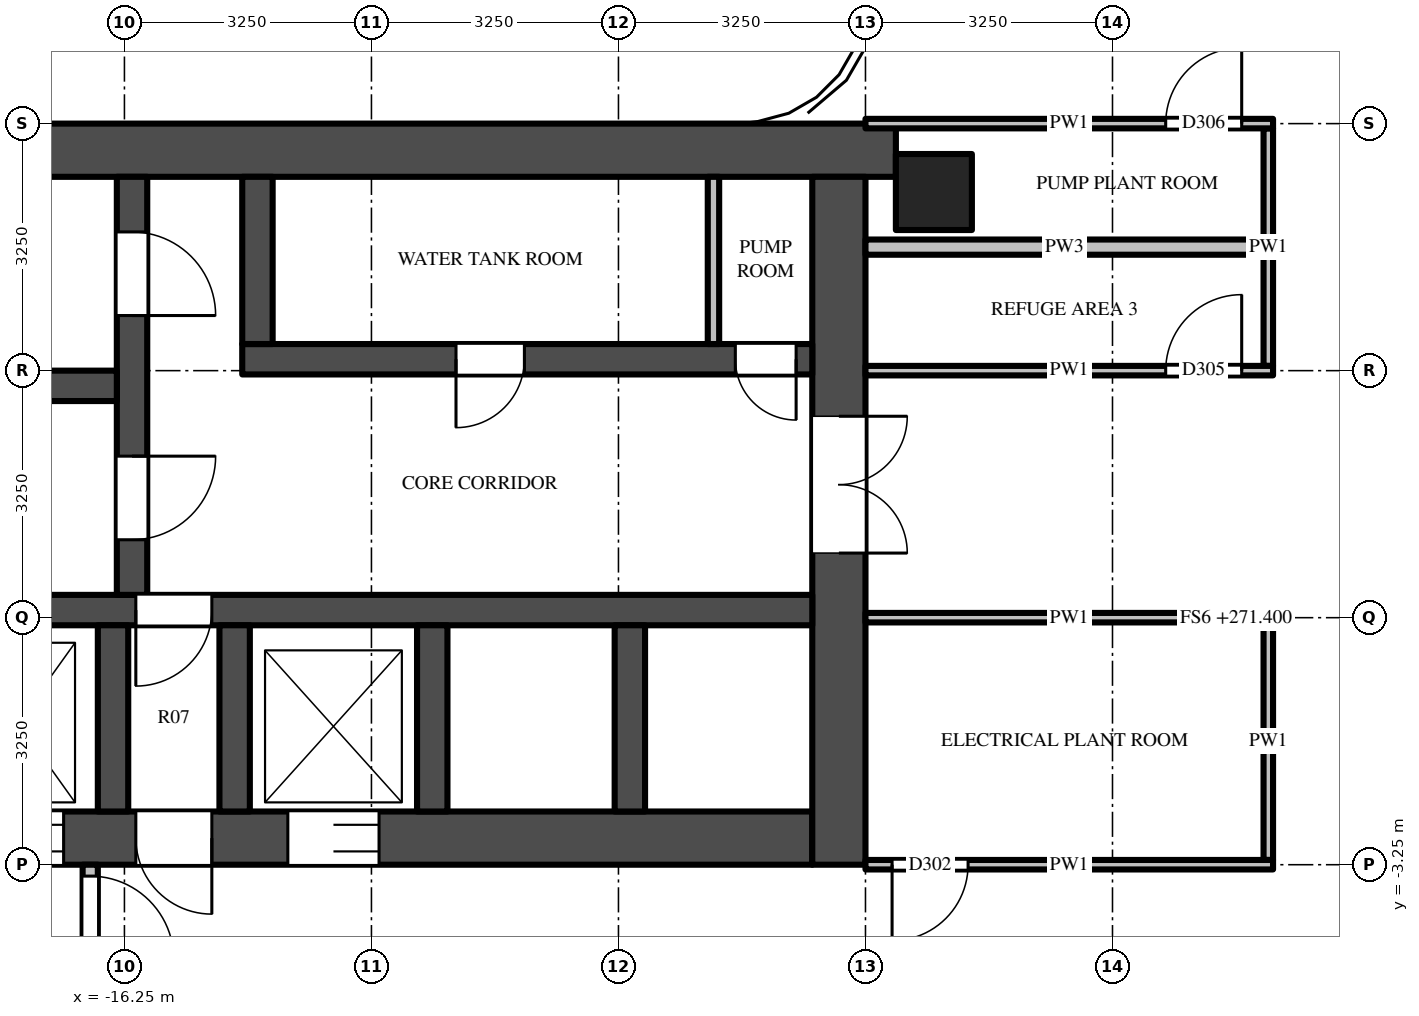
"""IFC4 building model, lengths in metres.
Left out: names, types, materials, properties, quantities, classifications, styles, units other than length and angle.
Written with IfcOpenShell. Run it as: python <this file> out.ifc"""

import sys

from ifc_helpers import new_model, si_unit, direction, frame, frame_2d, origin, origin_2d, place, context, subcontext, project, spatial, rectangle, extrude, source, transform, mapped, element, fill, save


model = new_model("IFC4")
c1 = context("Model", 3, precision=1e-05, world=origin(), true_north=direction((0.0, 1.0)))
c2 = subcontext(c1, "Body", "Model", "MODEL_VIEW")
j1 = project(units=[si_unit("LENGTHUNIT", "METRE"), si_unit("PLANEANGLEUNIT", "RADIAN")], contexts=[c1])
p1 = place(None, origin())
s1 = spatial("IfcSite", under=j1, at=p1, CompositionType="ELEMENT")
p2 = place(p1, origin())
s2 = spatial("IfcBuilding", under=s1, at=p2, CompositionType="ELEMENT")
p3 = place(p2, frame((0.0, 0.0, 271.4)))
s3 = spatial("IfcBuildingStorey", under=s2, at=p3, CompositionType="ELEMENT", Elevation=271.4)
m1 = source(origin(), c2, "Body", "SweptSolid", [
    extrude(rectangle(XDim=1.0, YDim=1.0, at=origin_2d()), origin(), (0.0, 0.0, 1.0), 8.0),
])
p4 = place(p3, frame((-5.6, 5.6, 0.0), z_axis=(0.0, 0.0, 1.0), x_axis=(1.0, 0.0, 0.0)))
e1 = element("IfcColumn", 1, at=p4, inside=s3, PredefinedType="COLUMN", context=c2, shape_type="MappedRepresentation", body=[
    mapped(m1, transform((0.0, 0.0, 0.0))),
])
m2 = source(origin(), c2, "Body", "SweptSolid", [
    extrude(rectangle(XDim=16.65, YDim=0.7, at=frame_2d((8.325, 0.0))), origin(), (0.0, 0.0, 1.0), 7.8),
])
p5 = place(p3, frame((-6.1, 6.15, 0.0), z_axis=(0.0, 0.0, 1.0), x_axis=(-1.0, 0.0, 0.0)))
e2 = element("IfcWall", 2, at=p5, inside=s3, PredefinedType="SHEAR", context=c2, shape_type="MappedRepresentation", body=[
    mapped(m2, transform((0.0, 0.0, 0.0))),
])
m3 = source(origin(), c2, "Body", "SweptSolid", [
    extrude(rectangle(XDim=14.85, YDim=0.7, at=frame_2d((7.425, 0.0))), origin(), (0.0, 0.0, 1.0), 7.8),
])
p6 = place(p3, frame((-7.2, -2.9, 0.0), z_axis=(0.0, 0.0, 1.0), x_axis=(-1.0, 0.0, 0.0)))
e3 = element("IfcWall", 3, at=p6, inside=s3, PredefinedType="SHEAR", context=c2, shape_type="MappedRepresentation", body=[
    mapped(m3, transform((0.0, 0.0, 0.0))),
])
m4 = source(origin(), c2, "Body", "SweptSolid", [
    extrude(rectangle(XDim=1.2, YDim=2.1, at=frame_2d((0.6, 1.05))), frame((0.0, 0.36, 0.0), z_axis=(0.0, -1.0, 0.0), x_axis=(1.0, 0.0, 0.0)), (0.0, 0.0, 1.0), 0.72),
])
p7 = place(p6, frame((5.7, 0.0, 0.0)))
e4 = element("IfcOpeningElement", 4, at=p7, cuts=e3, PredefinedType="OPENING", context=c2, shape_type="MappedRepresentation", body=[
    mapped(m4, transform((0.0, 0.0, 0.0))),
])
m5 = source(origin(), c2, "Body", "SweptSolid", [
    extrude(rectangle(XDim=1.3, YDim=2.1, at=frame_2d((0.65, 1.05))), frame((0.0, 0.36, 0.0), z_axis=(0.0, -1.0, 0.0), x_axis=(1.0, 0.0, 0.0)), (0.0, 0.0, 1.0), 0.72),
])
p8 = place(p6, frame((12.2, 0.0, 0.0)))
e5 = element("IfcOpeningElement", 5, at=p8, cuts=e3, PredefinedType="OPENING", context=c2, shape_type="MappedRepresentation", body=[
    mapped(m5, transform((0.0, 0.0, 0.0))),
])
p9 = place(p6, frame((9.85, 0.0, 0.0)))
e6 = element("IfcOpeningElement", 6, at=p9, cuts=e3, PredefinedType="OPENING", context=c2, shape_type="MappedRepresentation", body=[
    mapped(m4, transform((0.0, 0.0, 0.0))),
])
m6 = source(origin(), c2, "Body", "SweptSolid", [
    extrude(rectangle(XDim=1.0, YDim=2.1, at=frame_2d((0.5, 1.05))), frame((0.0, 0.36, 0.0), z_axis=(0.0, -1.0, 0.0), x_axis=(1.0, 0.0, 0.0)), (0.0, 0.0, 1.0), 0.72),
])
p10 = place(p6, frame((7.9, 0.0, 0.0)))
e7 = element("IfcOpeningElement", 7, at=p10, cuts=e3, PredefinedType="OPENING", context=c2, shape_type="MappedRepresentation", body=[
    mapped(m6, transform((0.0, 0.0, 0.0))),
])
m7 = source(origin(), c2, "Body", "SweptSolid", [
    extrude(rectangle(XDim=9.05, YDim=0.7, at=frame_2d((4.525, 0.0))), origin(), (0.0, 0.0, 1.0), 7.8),
])
p11 = place(p3, frame((-6.85, 5.8, 0.0), z_axis=(0.0, 0.0, 1.0), x_axis=(0.0, -1.0, 0.0)))
e8 = element("IfcWall", 8, at=p11, inside=s3, PredefinedType="SHEAR", context=c2, shape_type="MappedRepresentation", body=[
    mapped(m7, transform((0.0, 0.0, 0.0))),
])
m8 = source(origin(), c2, "Body", "SweptSolid", [
    extrude(rectangle(XDim=1.8, YDim=2.1, at=frame_2d((0.9, 1.05))), frame((0.0, 0.36, 0.0), z_axis=(0.0, -1.0, 0.0), x_axis=(1.0, 0.0, 0.0)), (0.0, 0.0, 1.0), 0.72),
])
p12 = place(p11, frame((3.15, 0.0, 0.0)))
e9 = element("IfcOpeningElement", 9, at=p12, cuts=e8, PredefinedType="OPENING", context=c2, shape_type="MappedRepresentation", body=[
    mapped(m8, transform((0.0, 0.0, 0.0))),
])
m9 = source(origin(), c2, "Body", "SweptSolid", [
    extrude(rectangle(XDim=7.5, YDim=0.4, at=frame_2d((3.75, 0.0))), origin(), (0.0, 0.0, 1.0), 7.8),
])
p13 = place(p3, frame((-7.2, 3.4, 0.0), z_axis=(0.0, 0.0, 1.0), x_axis=(-1.0, 0.0, 0.0)))
e10 = element("IfcWall", 10, at=p13, inside=s3, PredefinedType="SHEAR", context=c2, shape_type="MappedRepresentation", body=[
    mapped(m9, transform((0.0, 0.0, 0.0))),
])
m10 = source(origin(), c2, "Body", "SweptSolid", [
    extrude(rectangle(XDim=0.8, YDim=2.1, at=frame_2d((0.4, 1.05))), frame((0.0, 0.21, 0.0), z_axis=(0.0, -1.0, 0.0), x_axis=(1.0, 0.0, 0.0)), (0.0, 0.0, 1.0), 0.42),
])
p14 = place(p13, frame((0.212, 0.0, 0.0)))
e11 = element("IfcOpeningElement", 11, at=p14, cuts=e10, PredefinedType="OPENING", context=c2, shape_type="MappedRepresentation", body=[
    mapped(m10, transform((0.0, 0.0, 0.0))),
])
m11 = source(origin(), c2, "Body", "SweptSolid", [
    extrude(rectangle(XDim=0.9, YDim=2.1, at=frame_2d((0.45, 1.05))), frame((0.0, 0.21, 0.0), z_axis=(0.0, -1.0, 0.0), x_axis=(1.0, 0.0, 0.0)), (0.0, 0.0, 1.0), 0.42),
])
p15 = place(p13, frame((3.788, 0.0, 0.0)))
e12 = element("IfcOpeningElement", 12, at=p15, cuts=e10, PredefinedType="OPENING", context=c2, shape_type="MappedRepresentation", body=[
    mapped(m11, transform((0.0, 0.0, 0.0))),
])
m12 = source(origin(), c2, "Body", "SweptSolid", [
    extrude(rectangle(XDim=14.85, YDim=0.4, at=frame_2d((7.425, 0.0))), origin(), (0.0, 0.0, 1.0), 7.8),
])
p16 = place(p3, frame((-7.2, 0.1, 0.0), z_axis=(0.0, 0.0, 1.0), x_axis=(-1.0, 0.0, 0.0)))
e13 = element("IfcWall", 13, at=p16, inside=s3, PredefinedType="SHEAR", context=c2, shape_type="MappedRepresentation", body=[
    mapped(m12, transform((0.0, 0.0, 0.0))),
])
m13 = source(origin(), c2, "Body", "SweptSolid", [
    extrude(rectangle(XDim=1.0, YDim=2.1, at=frame_2d((0.5, 1.05))), frame((0.0, 0.21, 0.0), z_axis=(0.0, -1.0, 0.0), x_axis=(1.0, 0.0, 0.0)), (0.0, 0.0, 1.0), 0.42),
])
p17 = place(p16, frame((7.9, 0.0, 0.0)))
e14 = element("IfcOpeningElement", 14, at=p17, cuts=e13, PredefinedType="OPENING", context=c2, shape_type="MappedRepresentation", body=[
    mapped(m13, transform((0.0, 0.0, 0.0))),
])
m14 = source(origin(), c2, "Body", "SweptSolid", [
    extrude(rectangle(XDim=5.5, YDim=0.4, at=frame_2d((2.75, 0.0))), origin(), (0.0, 0.0, 1.0), 7.8),
])
p18 = place(p3, frame((-16.15, 5.8, 0.0), z_axis=(0.0, 0.0, 1.0), x_axis=(0.0, -1.0, 0.0)))
e15 = element("IfcWall", 15, at=p18, inside=s3, PredefinedType="SHEAR", context=c2, shape_type="MappedRepresentation", body=[
    mapped(m14, transform((0.0, 0.0, 0.0))),
])
m15 = source(origin(), c2, "Body", "SweptSolid", [
    extrude(rectangle(XDim=1.1, YDim=2.1, at=frame_2d((0.55, 1.05))), frame((0.0, 0.21, 0.0), z_axis=(0.0, -1.0, 0.0), x_axis=(1.0, 0.0, 0.0)), (0.0, 0.0, 1.0), 0.42),
])
p19 = place(p18, frame((0.725, 0.0, 0.0)))
e16 = element("IfcOpeningElement", 16, at=p19, cuts=e15, PredefinedType="OPENING", context=c2, shape_type="MappedRepresentation", body=[
    mapped(m15, transform((0.0, 0.0, 0.0))),
])
p20 = place(p18, frame((3.675, 0.0, 0.0)))
e17 = element("IfcOpeningElement", 17, at=p20, cuts=e15, PredefinedType="OPENING", context=c2, shape_type="MappedRepresentation", body=[
    mapped(m15, transform((0.0, 0.0, 0.0))),
])
m16 = source(origin(), c2, "Body", "SweptSolid", [
    extrude(rectangle(XDim=5.7, YDim=0.4, at=frame_2d((2.85, 0.0))), origin(), (0.0, 0.0, 1.0), 7.8),
])
p21 = place(p3, frame((-16.35, 3.05, 0.0), z_axis=(0.0, 0.0, 1.0), x_axis=(-1.0, 0.0, 0.0)))
e18 = element("IfcWall", 18, at=p21, inside=s3, PredefinedType="SHEAR", context=c2, shape_type="MappedRepresentation", body=[
    mapped(m16, transform((0.0, 0.0, 0.0))),
])
m17 = source(origin(), c2, "Body", "SweptSolid", [
    extrude(rectangle(XDim=2.2, YDim=0.4, at=frame_2d((1.1, 0.0))), origin(), (0.0, 0.0, 1.0), 7.8),
])
p22 = place(p3, frame((-14.5, 5.8, 0.0), z_axis=(0.0, 0.0, 1.0), x_axis=(0.0, -1.0, 0.0)))
e19 = element("IfcWall", 19, at=p22, inside=s3, PredefinedType="SHEAR", context=c2, shape_type="MappedRepresentation", body=[
    mapped(m17, transform((0.0, 0.0, 0.0))),
])
m18 = source(origin(), c2, "Body", "SweptSolid", [
    extrude(rectangle(XDim=2.45, YDim=0.4, at=frame_2d((1.225, 0.0))), origin(), (0.0, 0.0, 1.0), 7.8),
])
for number, where, z_axis, x_axis in (
    (20, (-9.6, -0.1, 0.0), (0.0, 0.0, 1.0), (0.0, -1.0, 0.0)),
    (21, (-12.2, -0.1, 0.0), (0.0, 0.0, 1.0), (0.0, -1.0, 0.0)),
    (22, (-14.8, -0.1, 0.0), (0.0, 0.0, 1.0), (0.0, -1.0, 0.0)),
    (23, (-16.4, -0.1, 0.0), (0.0, 0.0, 1.0), (0.0, -1.0, 0.0)),
):
    element("IfcWall", number, at=place(p3, frame(where, z_axis=z_axis, x_axis=x_axis)), inside=s3, PredefinedType="SHEAR", context=c2, shape_type="MappedRepresentation", body=[
        mapped(m18, transform((0.0, 0.0, 0.0))),
    ])
m19 = source(origin(), c2, "Body", "SweptSolid", [
    extrude(rectangle(XDim=3.25, YDim=0.2, at=frame_2d((1.625, 0.0))), origin(), (0.0, 0.0, 1.0), 7.8),
])
p23 = place(p3, frame((-16.7, -3.25, 0.0), z_axis=(0.0, 0.0, 1.0), x_axis=(0.0, -1.0, 0.0)))
e24 = element("IfcWall", 24, at=p23, inside=s3, PredefinedType="PARTITIONING", context=c2, shape_type="MappedRepresentation", body=[
    mapped(m19, transform((0.0, 0.0, 0.0))),
])
m20 = source(origin(), c2, "Body", "SweptSolid", [
    extrude(rectangle(XDim=1.1, YDim=2.1, at=frame_2d((0.55, 1.05))), frame((0.0, 0.11, 0.0), z_axis=(0.0, -1.0, 0.0), x_axis=(1.0, 0.0, 0.0)), (0.0, 0.0, 1.0), 0.22),
])
p24 = place(p23, frame((0.15, 0.0, 0.0)))
e25 = element("IfcOpeningElement", 25, at=p24, cuts=e24, PredefinedType="OPENING", context=c2, shape_type="MappedRepresentation", body=[
    mapped(m20, transform((0.0, 0.0, 0.0))),
])
m21 = source(origin(), c2, "Body", "SweptSolid", [
    extrude(rectangle(XDim=2.2, YDim=0.15, at=frame_2d((1.1, 0.0))), origin(), (0.0, 0.0, 1.0), 7.8),
])
p25 = place(p3, frame((-8.5, 5.8, 0.0), z_axis=(0.0, 0.0, 1.0), x_axis=(0.0, -1.0, 0.0)))
e26 = element("IfcWall", 26, at=p25, inside=s3, PredefinedType="PARTITIONING", context=c2, shape_type="MappedRepresentation", body=[
    mapped(m21, transform((0.0, 0.0, 0.0))),
])
m22 = source(origin(), c2, "Body", "SweptSolid", [
    extrude(rectangle(XDim=3.125, YDim=0.125, at=frame_2d((1.562, 0.0))), origin(), (0.0, 0.0, 1.0), 7.168),
])
p26 = place(p3, frame((-1.2, -0.062, 0.0), z_axis=(0.0, 0.0, 1.0), x_axis=(0.0, -1.0, 0.0)))
e27 = element("IfcWall", 27, at=p26, inside=s3, PredefinedType="PARTITIONING", context=c2, shape_type="MappedRepresentation", body=[
    mapped(m22, transform((0.0, 0.0, 0.0))),
])
m23 = source(origin(), c2, "Body", "SweptSolid", [
    extrude(rectangle(XDim=3.125, YDim=0.125, at=frame_2d((1.562, 0.0))), origin(), (0.0, 0.0, 1.0), 7.097),
])
p27 = place(p3, frame((-1.2, 6.438, 0.0), z_axis=(0.0, 0.0, 1.0), x_axis=(0.0, -1.0, 0.0)))
e28 = element("IfcWall", 28, at=p27, inside=s3, PredefinedType="PARTITIONING", context=c2, shape_type="MappedRepresentation", body=[
    mapped(m23, transform((0.0, 0.0, 0.0))),
])
m24 = source(origin(), c2, "Body", "SweptSolid", [
    extrude(rectangle(XDim=5.363, YDim=0.125, at=frame_2d((2.681, 0.0))), origin(), (0.0, 0.0, 1.0), 7.097),
])
p28 = place(p3, frame((-1.137, -3.25, 0.0), z_axis=(0.0, 0.0, 1.0), x_axis=(-1.0, 0.0, 0.0)))
e29 = element("IfcWall", 29, at=p28, inside=s3, PredefinedType="PARTITIONING", context=c2, shape_type="MappedRepresentation", body=[
    mapped(m24, transform((0.0, 0.0, 0.0))),
])
m25 = source(origin(), c2, "Body", "SweptSolid", [
    extrude(rectangle(XDim=1.0, YDim=2.1, at=frame_2d((0.5, 1.05))), frame((0.0, 0.073, 0.0), z_axis=(0.0, -1.0, 0.0), x_axis=(1.0, 0.0, 0.0)), (0.0, 0.0, 1.0), 0.145),
])
p29 = place(p28, frame((4.012, 0.0, 0.0)))
e30 = element("IfcOpeningElement", 30, at=p29, cuts=e29, PredefinedType="OPENING", context=c2, shape_type="MappedRepresentation", body=[
    mapped(m25, transform((0.0, 0.0, 0.0))),
])
p30 = place(p3, frame((-1.137, 0.0, 0.0), z_axis=(0.0, 0.0, 1.0), x_axis=(-1.0, 0.0, 0.0)))
e31 = element("IfcWall", 31, at=p30, inside=s3, PredefinedType="PARTITIONING", context=c2, shape_type="MappedRepresentation", body=[
    mapped(m24, transform((0.0, 0.0, 0.0))),
])
p31 = place(p3, frame((-6.5, 3.25, 0.0), z_axis=(0.0, 0.0, 1.0), x_axis=(1.0, 0.0, 0.0)))
e32 = element("IfcWall", 32, at=p31, inside=s3, PredefinedType="PARTITIONING", context=c2, shape_type="MappedRepresentation", body=[
    mapped(m24, transform((0.0, 0.0, 0.0))),
])
p32 = place(p31, frame((3.95, 0.0, 0.0)))
e33 = element("IfcOpeningElement", 33, at=p32, cuts=e32, PredefinedType="OPENING", context=c2, shape_type="MappedRepresentation", body=[
    mapped(m25, transform((0.0, 0.0, 0.0))),
])
p33 = place(p3, frame((-6.5, 4.875, 0.0), z_axis=(0.0, 0.0, 1.0), x_axis=(1.0, 0.0, 0.0)))
e34 = element("IfcWall", 34, at=p33, inside=s3, PredefinedType="PARTITIONING", context=c2, shape_type="SweptSolid", body=[
    extrude(rectangle(XDim=5.238, YDim=0.2, at=frame_2d((2.619, 0.0))), origin(), (0.0, 0.0, 1.0), 7.097),
])
m26 = source(origin(), c2, "Body", "SweptSolid", [
    extrude(rectangle(XDim=5.363, YDim=0.125, at=frame_2d((2.681, 0.0))), origin(), (0.0, 0.0, 1.0), 7.28),
])
p34 = place(p3, frame((-6.5, 6.5, 0.0), z_axis=(0.0, 0.0, 1.0), x_axis=(1.0, 0.0, 0.0)))
e35 = element("IfcWall", 35, at=p34, inside=s3, PredefinedType="PARTITIONING", context=c2, shape_type="MappedRepresentation", body=[
    mapped(m26, transform((0.0, 0.0, 0.0))),
])
p35 = place(p34, frame((3.95, 0.0, 0.0)))
e36 = element("IfcOpeningElement", 36, at=p35, cuts=e35, PredefinedType="OPENING", context=c2, shape_type="MappedRepresentation", body=[
    mapped(m25, transform((0.0, 0.0, 0.0))),
])
m27 = source(origin(), c2, "Body", "SweptSolid", [
    extrude(rectangle(XDim=1.2, YDim=2.1, at=frame_2d((0.6, 1.05))), frame((0.0, -0.275, 0.0), z_axis=(0.0, -1.0, 0.0), x_axis=(1.0, 0.0, 0.0)), (0.0, 0.0, 1.0), 0.05),
])
p36 = place(p7, origin())
e37 = element("IfcDoor", 37, at=p36, inside=s3, OperationType="DOUBLE_DOOR_SLIDING", PredefinedType="DOOR", context=c2, shape_type="MappedRepresentation", body=[
    mapped(m27, transform((0.0, 0.0, 0.0))),
])
fill(e4, e37)
p37 = place(p9, origin())
e38 = element("IfcDoor", 38, at=p37, inside=s3, OperationType="DOUBLE_DOOR_SLIDING", PredefinedType="DOOR", context=c2, shape_type="MappedRepresentation", body=[
    mapped(m27, transform((0.0, 0.0, 0.0))),
])
fill(e6, e38)
m28 = source(origin(), c2, "Body", "SweptSolid", [
    extrude(rectangle(XDim=1.8, YDim=2.1, at=frame_2d((0.9, 1.05))), frame((0.0, -0.275, 0.0), z_axis=(0.0, -1.0, 0.0), x_axis=(1.0, 0.0, 0.0)), (0.0, 0.0, 1.0), 0.05),
])
p38 = place(p12, origin())
e39 = element("IfcDoor", 39, at=p38, inside=s3, OperationType="DOUBLE_DOOR_SINGLE_SWING", PredefinedType="DOOR", context=c2, shape_type="MappedRepresentation", body=[
    mapped(m28, transform((0.0, 0.0, 0.0))),
])
fill(e9, e39)
m29 = source(origin(), c2, "Body", "SweptSolid", [
    extrude(rectangle(XDim=1.1, YDim=2.1, at=frame_2d((0.55, 1.05))), frame((0.0, 0.025, 0.0), z_axis=(0.0, -1.0, 0.0), x_axis=(1.0, 0.0, 0.0)), (0.0, 0.0, 1.0), 0.05),
])
p39 = place(p19, origin())
e40 = element("IfcDoor", 40, at=p39, inside=s3, OperationType="SINGLE_SWING_RIGHT", PredefinedType="DOOR", context=c2, shape_type="MappedRepresentation", body=[
    mapped(m29, transform((0.0, 0.0, 0.0))),
])
fill(e16, e40)
p40 = place(p20, origin())
e41 = element("IfcDoor", 41, at=p40, inside=s3, OperationType="SINGLE_SWING_LEFT", PredefinedType="DOOR", context=c2, shape_type="MappedRepresentation", body=[
    mapped(m29, transform((0.0, 0.0, 0.0))),
])
fill(e17, e41)
m30 = source(origin(), c2, "Body", "SweptSolid", [
    extrude(rectangle(XDim=1.0, YDim=2.1, at=frame_2d((0.5, 1.05))), frame((0.0, 0.025, 0.0), z_axis=(0.0, -1.0, 0.0), x_axis=(1.0, 0.0, 0.0)), (0.0, 0.0, 1.0), 0.05),
])
p41 = place(p17, origin())
e42 = element("IfcDoor", 42, at=p41, inside=s3, OperationType="SINGLE_SWING_RIGHT", PredefinedType="DOOR", context=c2, shape_type="MappedRepresentation", body=[
    mapped(m30, transform((0.0, 0.0, 0.0))),
])
fill(e14, e42)
m31 = source(origin(), c2, "Body", "SweptSolid", [
    extrude(rectangle(XDim=1.0, YDim=2.1, at=frame_2d((0.5, 1.05))), frame((0.0, -0.275, 0.0), z_axis=(0.0, -1.0, 0.0), x_axis=(1.0, 0.0, 0.0)), (0.0, 0.0, 1.0), 0.05),
])
p42 = place(p10, origin())
e43 = element("IfcDoor", 43, at=p42, inside=s3, OperationType="SINGLE_SWING_LEFT", PredefinedType="DOOR", context=c2, shape_type="MappedRepresentation", body=[
    mapped(m31, transform((0.0, 0.0, 0.0))),
])
fill(e7, e43)
p43 = place(p24, origin())
e44 = element("IfcDoor", 44, at=p43, inside=s3, OperationType="SINGLE_SWING_RIGHT", PredefinedType="DOOR", context=c2, shape_type="MappedRepresentation", body=[
    mapped(m29, transform((0.0, 0.0, 0.0))),
])
fill(e25, e44)
m32 = source(origin(), c2, "Body", "SweptSolid", [
    extrude(rectangle(XDim=0.8, YDim=2.1, at=frame_2d((0.4, 1.05))), frame((0.0, 0.025, 0.0), z_axis=(0.0, -1.0, 0.0), x_axis=(1.0, 0.0, 0.0)), (0.0, 0.0, 1.0), 0.05),
])
p44 = place(p14, origin())
e45 = element("IfcDoor", 45, at=p44, inside=s3, OperationType="SINGLE_SWING_LEFT", PredefinedType="DOOR", context=c2, shape_type="MappedRepresentation", body=[
    mapped(m32, transform((0.0, 0.0, 0.0))),
])
fill(e11, e45)
m33 = source(origin(), c2, "Body", "SweptSolid", [
    extrude(rectangle(XDim=0.9, YDim=2.1, at=frame_2d((0.45, 1.05))), frame((0.0, 0.025, 0.0), z_axis=(0.0, -1.0, 0.0), x_axis=(1.0, 0.0, 0.0)), (0.0, 0.0, 1.0), 0.05),
])
p45 = place(p15, origin())
e46 = element("IfcDoor", 46, at=p45, inside=s3, OperationType="SINGLE_SWING_RIGHT", PredefinedType="DOOR", context=c2, shape_type="MappedRepresentation", body=[
    mapped(m33, transform((0.0, 0.0, 0.0))),
])
fill(e12, e46)
p46 = place(p29, origin())
e47 = element("IfcDoor", 47, at=p46, inside=s3, OperationType="SINGLE_SWING_RIGHT", PredefinedType="DOOR", context=c2, shape_type="MappedRepresentation", body=[
    mapped(m30, transform((0.0, 0.0, 0.0))),
])
fill(e30, e47)
p47 = place(p32, origin())
e48 = element("IfcDoor", 48, at=p47, inside=s3, OperationType="SINGLE_SWING_RIGHT", PredefinedType="DOOR", context=c2, shape_type="MappedRepresentation", body=[
    mapped(m30, transform((0.0, 0.0, 0.0))),
])
fill(e33, e48)
p48 = place(p35, origin())
e49 = element("IfcDoor", 49, at=p48, inside=s3, OperationType="SINGLE_SWING_RIGHT", PredefinedType="DOOR", context=c2, shape_type="MappedRepresentation", body=[
    mapped(m30, transform((0.0, 0.0, 0.0))),
])
fill(e36, e49)
save(model, sys.argv[1])
